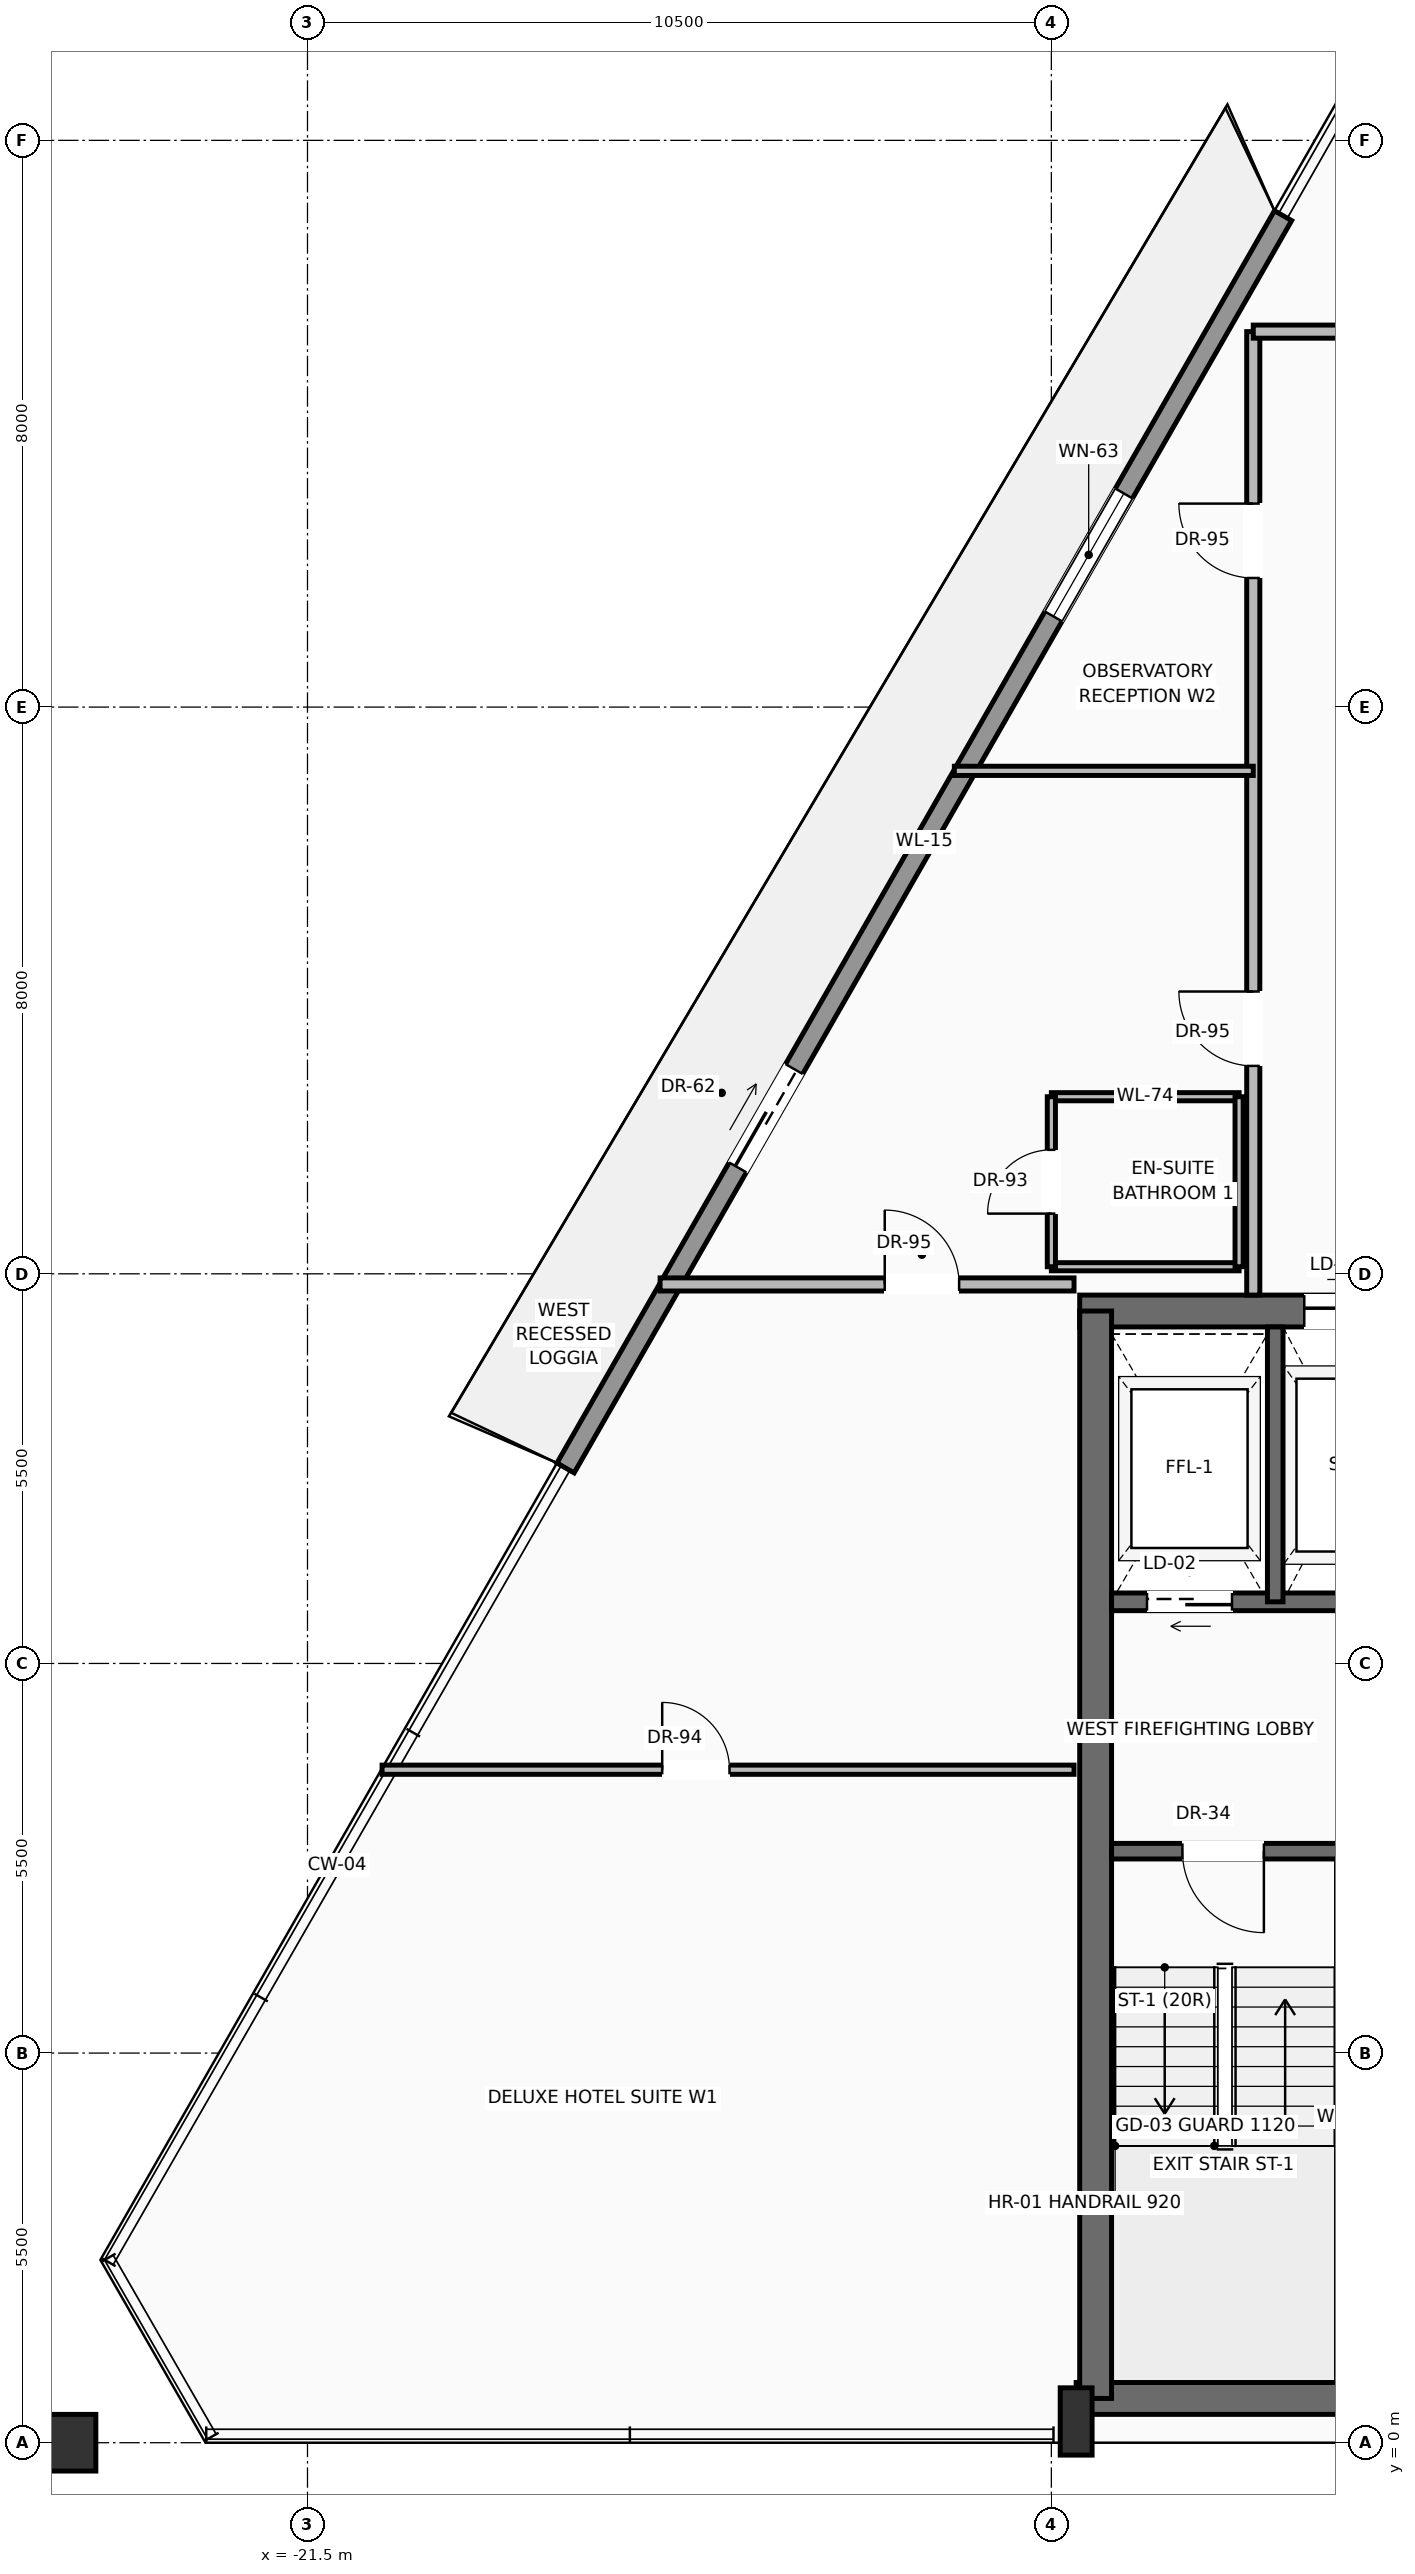
"""IFC4 building model, lengths in metres.
Left out: names, types, materials, properties, quantities, classifications, styles, units other than length and angle.
Written with IfcOpenShell. Run it as: python <this file> out.ifc"""

import sys

from ifc_helpers import new_model, si_unit, direction, frame, frame_2d, origin, origin_2d, place, context, subcontext, project, spatial, rectangle, hollow_rectangle, extrude, source, transform, mapped, element, fill, save


model = new_model("IFC4")
c1 = context("Model", 3, precision=1e-05, world=origin(), true_north=direction((0.0, 1.0)))
c2 = subcontext(c1, "Body", "Model", "MODEL_VIEW")
j1 = project(units=[si_unit("LENGTHUNIT", "METRE"), si_unit("PLANEANGLEUNIT", "RADIAN")], contexts=[c1])
p1 = place(None, origin())
s1 = spatial("IfcSite", under=j1, at=p1, CompositionType="ELEMENT")
p2 = place(p1, origin())
s2 = spatial("IfcBuilding", under=s1, at=p2, CompositionType="ELEMENT")
p3 = place(p2, frame((0.0, 0.0, 297.15)))
s3 = spatial("IfcBuildingStorey", under=s2, at=p3, CompositionType="ELEMENT", Elevation=297.15)
p4 = place(p3, frame((-10.65, 0.625, 0.0), z_axis=(0.0, 0.0, 1.0), x_axis=(1.0, 0.0, 0.0)))
e1 = element("IfcWall", 1, at=p4, inside=s3, PredefinedType="SHEAR", context=c2, shape_type="SweptSolid", body=[
    extrude(rectangle(XDim=21.3, YDim=0.45, at=frame_2d((10.65, 0.0))), origin(), (0.0, 0.0, 1.0), 3.24),
])
p5 = place(p3, frame((-10.6, 15.975, 0.0), z_axis=(0.0, 0.0, 1.0), x_axis=(1.0, 0.0, 0.0)))
e2 = element("IfcWall", 2, at=p5, inside=s3, PredefinedType="SHEAR", context=c2, shape_type="SweptSolid", body=[
    extrude(rectangle(XDim=21.2, YDim=0.45, at=frame_2d((10.6, 0.0))), origin(), (0.0, 0.0, 1.0), 3.24),
])
p6 = place(p5, frame((3.17, 0.0, 0.0)))
e3 = element("IfcOpeningElement", 3, at=p6, cuts=e2, PredefinedType="OPENING", context=c2, shape_type="SweptSolid", body=[
    extrude(rectangle(XDim=1.3, YDim=2.3, at=frame_2d((0.65, 1.15))), frame((0.0, 0.235, 0.0), z_axis=(0.0, -1.0, 0.0), x_axis=(1.0, 0.0, 0.0)), (0.0, 0.0, 1.0), 0.47),
])
p7 = place(p5, frame((9.6, 0.0, 0.0)))
e4 = element("IfcOpeningElement", 4, at=p7, cuts=e2, PredefinedType="OPENING", context=c2, shape_type="SweptSolid", body=[
    extrude(rectangle(XDim=2.0, YDim=2.4, at=frame_2d((1.0, 1.2))), frame((0.0, 0.235, 0.0), z_axis=(0.0, -1.0, 0.0), x_axis=(1.0, 0.0, 0.0)), (0.0, 0.0, 1.0), 0.47),
])
p8 = place(p3, frame((-10.375, 0.625, 0.0), z_axis=(0.0, 0.0, 1.0), x_axis=(0.0, 1.0, 0.0)))
e5 = element("IfcWall", 5, at=p8, inside=s3, PredefinedType="SHEAR", context=c2, shape_type="SweptSolid", body=[
    extrude(rectangle(XDim=15.35, YDim=0.45, at=frame_2d((7.675, 0.0))), origin(), (0.0, 0.0, 1.0), 3.24),
])
m1 = source(origin(), c2, "Body", "SweptSolid", [
    extrude(rectangle(XDim=0.45, YDim=0.95, at=origin_2d()), origin(), (0.0, 0.0, 1.0), 3.45),
])
p9 = place(p3, frame((-10.65, 0.3, 0.0), z_axis=(0.0, 0.0, 1.0), x_axis=(1.0, 0.0, 0.0)))
e6 = element("IfcColumn", 6, at=p9, inside=s3, PredefinedType="PILASTER", context=c2, shape_type="MappedRepresentation", body=[
    mapped(m1, transform((0.0, 0.0, 0.0), scale=1.0)),
])
m2 = source(origin(), c2, "Body", "SweptSolid", [
    extrude(hollow_rectangle(XDim=0.8, YDim=0.8, WallThickness=0.04, at=origin_2d()), origin(), (0.0, 0.0, 1.0), 3.441),
])
p10 = place(p3, frame((-24.888, 0.0, 0.004), z_axis=(0.003547083247, 0.0, 0.99999370908), x_axis=(0.0, 1.0, 0.0)))
e7 = element("IfcColumn", 7, at=p10, inside=s3, PredefinedType="COLUMN", context=c2, shape_type="MappedRepresentation", body=[
    mapped(m2, transform((0.0, 0.0, 0.0), scale=1.0)),
])
m3 = source(origin(), c2, "Body", "SweptSolid", [
    extrude(hollow_rectangle(XDim=0.8, YDim=0.8, WallThickness=0.04, at=origin_2d()), origin(), (0.0, 0.0, 1.0), 3.442),
])
p11 = place(p3, frame((-25.693, 1.352, 0.004), z_axis=(0.014114259928, -0.016029260019, 0.99977189923), x_axis=(0.750515848347, 0.660852450536, 0.0)))
e8 = element("IfcColumn", 8, at=p11, inside=s3, PredefinedType="COLUMN", context=c2, shape_type="MappedRepresentation", body=[
    mapped(m3, transform((0.0, 0.0, 0.0), scale=1.0)),
])
p12 = place(p3, frame((-17.857, 13.76, 0.0), z_axis=(0.0, 0.0, 1.0), x_axis=(0.497115564006, 0.867684341234, 0.0)))
e9 = element("IfcWall", 9, at=p12, inside=s3, PredefinedType="SOLIDWALL", context=c2, shape_type="SweptSolid", body=[
    extrude(rectangle(XDim=20.373, YDim=0.28, at=frame_2d((10.187, 0.0))), origin(), (0.0, 0.0, 1.0), 2.82),
])
p13 = place(p12, frame((4.889, 0.0, 0.0)))
e10 = element("IfcOpeningElement", 10, at=p13, cuts=e9, PredefinedType="OPENING", context=c2, shape_type="SweptSolid", body=[
    extrude(rectangle(XDim=1.6, YDim=2.35, at=frame_2d((0.8, 1.175))), frame((0.0, 0.15, 0.0), z_axis=(0.0, -1.0, 0.0), x_axis=(1.0, 0.0, 0.0)), (0.0, 0.0, 1.0), 0.3),
])
p14 = place(p12, frame((13.854, 0.0, 0.9)))
e11 = element("IfcOpeningElement", 11, at=p14, cuts=e9, PredefinedType="OPENING", context=c2, shape_type="SweptSolid", body=[
    extrude(rectangle(XDim=2.0, YDim=1.75, at=frame_2d((1.0, 0.875))), frame((0.0, 0.15, 0.0), z_axis=(0.0, -1.0, 0.0), x_axis=(1.0, 0.0, 0.0)), (0.0, 0.0, 1.0), 0.3),
])
p15 = place(p3, frame((-5.5, 8.35, 0.0), z_axis=(0.0, 0.0, 1.0), x_axis=(-1.0, 0.0, 0.0)))
e12 = element("IfcWall", 12, at=p15, inside=s3, PredefinedType="SOLIDWALL", context=c2, shape_type="SweptSolid", body=[
    extrude(rectangle(XDim=4.65, YDim=0.22, at=frame_2d((2.325, 0.0))), origin(), (0.0, 0.0, 1.0), 3.24),
])
p16 = place(p15, frame((2.5, 0.0, 0.0)))
e13 = element("IfcOpeningElement", 13, at=p16, cuts=e12, PredefinedType="OPENING", context=c2, shape_type="SweptSolid", body=[
    extrude(rectangle(XDim=1.15, YDim=2.2, at=frame_2d((0.575, 1.1))), frame((0.0, 0.12, 0.0), z_axis=(0.0, -1.0, 0.0), x_axis=(1.0, 0.0, 0.0)), (0.0, 0.0, 1.0), 0.24),
])
p17 = place(p3, frame((-5.5, 11.87, 0.0), z_axis=(0.0, 0.0, 1.0), x_axis=(-1.0, 0.0, 0.0)))
e14 = element("IfcWall", 14, at=p17, inside=s3, PredefinedType="SOLIDWALL", context=c2, shape_type="SweptSolid", body=[
    extrude(rectangle(XDim=4.65, YDim=0.25, at=frame_2d((2.325, 0.0))), origin(), (0.0, 0.0, 1.0), 3.24),
])
p18 = place(p17, frame((2.95, 0.0, 0.0)))
e15 = element("IfcOpeningElement", 15, at=p18, cuts=e14, PredefinedType="OPENING", context=c2, shape_type="SweptSolid", body=[
    extrude(rectangle(XDim=1.2, YDim=2.25, at=frame_2d((0.6, 1.125))), frame((0.0, 0.135, 0.0), z_axis=(0.0, -1.0, 0.0), x_axis=(1.0, 0.0, 0.0)), (0.0, 0.0, 1.0), 0.27),
])
p19 = place(p3, frame((-7.84, 11.87, 0.0), z_axis=(0.0, 0.0, 1.0), x_axis=(0.0, 1.0, 0.0)))
e16 = element("IfcWall", 16, at=p19, inside=s3, PredefinedType="SOLIDWALL", context=c2, shape_type="SweptSolid", body=[
    extrude(rectangle(XDim=3.88, YDim=0.22, at=frame_2d((1.94, 0.0))), origin(), (0.0, 0.0, 1.0), 3.24),
])
p20 = place(p3, frame((-8.15, 16.2, 0.0), z_axis=(0.0, 0.0, 1.0), x_axis=(0.0, 1.0, 0.0)))
e17 = element("IfcWall", 17, at=p20, inside=s3, PredefinedType="PARTITIONING", context=c2, shape_type="SweptSolid", body=[
    extrude(rectangle(XDim=13.6, YDim=0.185, at=frame_2d((6.8, 0.0))), origin(), (0.0, 0.0, 1.0), 3.232),
])
p21 = place(p20, frame((3.235, 0.0, 0.0)))
e18 = element("IfcOpeningElement", 18, at=p21, cuts=e17, PredefinedType="OPENING", context=c2, shape_type="SweptSolid", body=[
    extrude(rectangle(XDim=1.05, YDim=2.25, at=frame_2d((0.525, 1.125))), frame((0.0, 0.103, 0.0), z_axis=(0.0, -1.0, 0.0), x_axis=(1.0, 0.0, 0.0)), (0.0, 0.0, 1.0), 0.205),
])
p22 = place(p20, frame((10.123, 0.0, 0.0)))
e19 = element("IfcOpeningElement", 19, at=p22, cuts=e17, PredefinedType="OPENING", context=c2, shape_type="SweptSolid", body=[
    extrude(rectangle(XDim=1.05, YDim=2.25, at=frame_2d((0.525, 1.125))), frame((0.0, 0.103, 0.0), z_axis=(0.0, -1.0, 0.0), x_axis=(1.0, 0.0, 0.0)), (0.0, 0.0, 1.0), 0.205),
])
p23 = place(p3, frame((-8.15, 29.8, 0.0), z_axis=(0.0, 0.0, 1.0), x_axis=(1.0, 0.0, 0.0)))
e20 = element("IfcWall", 20, at=p23, inside=s3, PredefinedType="PARTITIONING", context=c2, shape_type="SweptSolid", body=[
    extrude(rectangle(XDim=16.3, YDim=0.185, at=frame_2d((8.15, 0.0))), origin(), (0.0, 0.0, 1.0), 3.232),
])
p24 = place(p23, frame((3.347, 0.0, 0.0)))
e21 = element("IfcOpeningElement", 21, at=p24, cuts=e20, PredefinedType="OPENING", context=c2, shape_type="SweptSolid", body=[
    extrude(rectangle(XDim=1.05, YDim=2.25, at=frame_2d((0.525, 1.125))), frame((0.0, 0.103, 0.0), z_axis=(0.0, -1.0, 0.0), x_axis=(1.0, 0.0, 0.0)), (0.0, 0.0, 1.0), 0.205),
])
p25 = place(p23, frame((7.625, 0.0, 0.0)))
e22 = element("IfcOpeningElement", 22, at=p25, cuts=e20, PredefinedType="OPENING", context=c2, shape_type="SweptSolid", body=[
    extrude(rectangle(XDim=1.05, YDim=2.25, at=frame_2d((0.525, 1.125))), frame((0.0, 0.103, 0.0), z_axis=(0.0, -1.0, 0.0), x_axis=(1.0, 0.0, 0.0)), (0.0, 0.0, 1.0), 0.205),
])
p26 = place(p23, frame((11.903, 0.0, 0.0)))
e23 = element("IfcOpeningElement", 23, at=p26, cuts=e20, PredefinedType="OPENING", context=c2, shape_type="SweptSolid", body=[
    extrude(rectangle(XDim=1.05, YDim=2.25, at=frame_2d((0.525, 1.125))), frame((0.0, 0.103, 0.0), z_axis=(0.0, -1.0, 0.0), x_axis=(1.0, 0.0, 0.0)), (0.0, 0.0, 1.0), 0.205),
])
p27 = place(p3, frame((-16.523, 16.35, 0.0), z_axis=(0.0, 0.0, 1.0), x_axis=(1.0, 0.0, 0.0)))
e24 = element("IfcWall", 24, at=p27, inside=s3, PredefinedType="PARTITIONING", context=c2, shape_type="SweptSolid", body=[
    extrude(rectangle(XDim=5.843, YDim=0.185, at=frame_2d((2.921, 0.0))), origin(), (0.0, 0.0, 1.0), 3.232),
])
p28 = place(p27, frame((3.171, 0.0, 0.0)))
e25 = element("IfcOpeningElement", 25, at=p28, cuts=e24, PredefinedType="OPENING", context=c2, shape_type="SweptSolid", body=[
    extrude(rectangle(XDim=1.05, YDim=2.25, at=frame_2d((0.525, 1.125))), frame((0.0, 0.103, 0.0), z_axis=(0.0, -1.0, 0.0), x_axis=(1.0, 0.0, 0.0)), (0.0, 0.0, 1.0), 0.205),
])
p29 = place(p3, frame((-20.448, 9.5, 0.0), z_axis=(0.0, 0.0, 1.0), x_axis=(1.0, 0.0, 0.0)))
e26 = element("IfcWall", 26, at=p29, inside=s3, PredefinedType="PARTITIONING", context=c2, shape_type="SweptSolid", body=[
    extrude(rectangle(XDim=9.768, YDim=0.13, at=frame_2d((4.884, 0.0))), origin(), (0.0, 0.0, 1.0), 3.232),
])
p30 = place(p29, frame((3.954, 0.0, 0.0)))
e27 = element("IfcOpeningElement", 27, at=p30, cuts=e26, PredefinedType="OPENING", context=c2, shape_type="SweptSolid", body=[
    extrude(rectangle(XDim=0.95, YDim=2.2, at=frame_2d((0.475, 1.1))), frame((0.0, 0.075, 0.0), z_axis=(0.0, -1.0, 0.0), x_axis=(1.0, 0.0, 0.0)), (0.0, 0.0, 1.0), 0.15),
])
for number, where, z_axis, x_axis in (
    (28, (-11.0, 16.6, 0.0), (0.0, 0.0, 1.0), (1.0, 0.0, 0.0)),
    (29, (-11.0, 19.0, 0.0), (0.0, 0.0, 1.0), (1.0, 0.0, 0.0)),
):
    element("IfcWall", number, at=place(p3, frame(where, z_axis=z_axis, x_axis=x_axis)), inside=s3, PredefinedType="PARTITIONING", context=c2, shape_type="SweptSolid", body=[
        extrude(rectangle(XDim=2.65, YDim=0.115, at=frame_2d((1.325, 0.0))), origin(), (0.0, 0.0, 1.0), 3.232),
    ])
p31 = place(p3, frame((-11.0, 16.6, 0.0), z_axis=(0.0, 0.0, 1.0), x_axis=(0.0, 1.0, 0.0)))
e30 = element("IfcWall", 30, at=p31, inside=s3, PredefinedType="PARTITIONING", context=c2, shape_type="SweptSolid", body=[
    extrude(rectangle(XDim=2.4, YDim=0.115, at=frame_2d((1.2, 0.0))), origin(), (0.0, 0.0, 1.0), 3.232),
])
p32 = place(p31, frame((0.75, 0.0, 0.0)))
e31 = element("IfcOpeningElement", 31, at=p32, cuts=e30, PredefinedType="OPENING", context=c2, shape_type="SweptSolid", body=[
    extrude(rectangle(XDim=0.9, YDim=2.15, at=frame_2d((0.45, 1.075))), frame((0.0, 0.067, 0.0), z_axis=(0.0, -1.0, 0.0), x_axis=(1.0, 0.0, 0.0)), (0.0, 0.0, 1.0), 0.135),
])
p33 = place(p3, frame((-8.35, 16.6, 0.0), z_axis=(0.0, 0.0, 1.0), x_axis=(0.0, 1.0, 0.0)))
e32 = element("IfcWall", 32, at=p33, inside=s3, PredefinedType="PARTITIONING", context=c2, shape_type="SweptSolid", body=[
    extrude(rectangle(XDim=2.4, YDim=0.115, at=frame_2d((1.2, 0.0))), origin(), (0.0, 0.0, 1.0), 3.232),
])
p34 = place(p3, frame((-12.369, 23.6, 0.0), z_axis=(0.0, 0.0, 1.0), x_axis=(1.0, 0.0, 0.0)))
e33 = element("IfcWall", 33, at=p34, inside=s3, PredefinedType="PARTITIONING", context=c2, shape_type="SweptSolid", body=[
    extrude(rectangle(XDim=4.219, YDim=0.13, at=frame_2d((2.11, 0.0))), origin(), (0.0, 0.0, 1.0), 3.232),
])
m4 = source(origin(), c2, "Body", "SweptSolid", [
    extrude(rectangle(XDim=1.6, YDim=2.35, at=frame_2d((0.8, 1.175))), frame((0.0, 0.025, 0.0), z_axis=(0.0, -1.0, 0.0), x_axis=(1.0, 0.0, 0.0)), (0.0, 0.0, 1.0), 0.05),
])
p35 = place(p13, origin())
e34 = element("IfcDoor", 34, at=p35, inside=s3, OperationType="SLIDING_TO_LEFT", PredefinedType="DOOR", context=c2, shape_type="MappedRepresentation", body=[
    mapped(m4, transform((0.0, 0.0, 0.0), scale=1.0)),
])
fill(e10, e34)
m5 = source(origin(), c2, "Body", "SweptSolid", [
    extrude(rectangle(XDim=2.0, YDim=1.75, at=frame_2d((1.0, 0.875))), frame((0.0, 0.03, 0.0), z_axis=(0.0, -1.0, 0.0), x_axis=(1.0, 0.0, 0.0)), (0.0, 0.0, 1.0), 0.06),
])
p36 = place(p14, origin())
e35 = element("IfcWindow", 35, at=p36, inside=s3, PartitioningType="SINGLE_PANEL", PredefinedType="WINDOW", context=c2, shape_type="MappedRepresentation", body=[
    mapped(m5, transform((0.0, 0.0, 0.0), scale=1.0)),
])
fill(e11, e35)
m6 = source(origin(), c2, "Body", "SweptSolid", [
    extrude(rectangle(XDim=1.15, YDim=2.2, at=frame_2d((0.575, 1.1))), frame((0.0, 0.025, 0.0), z_axis=(0.0, -1.0, 0.0), x_axis=(1.0, 0.0, 0.0)), (0.0, 0.0, 1.0), 0.05),
])
p37 = place(p16, origin())
e36 = element("IfcDoor", 36, at=p37, inside=s3, OperationType="SINGLE_SWING_LEFT", PredefinedType="DOOR", context=c2, shape_type="MappedRepresentation", body=[
    mapped(m6, transform((0.0, 0.0, 0.0), scale=1.0)),
])
fill(e13, e36)
m7 = source(origin(), c2, "Body", "SweptSolid", [
    extrude(rectangle(XDim=1.2, YDim=2.25, at=frame_2d((0.6, 1.125))), frame((0.0, 0.025, 0.0), z_axis=(0.0, -1.0, 0.0), x_axis=(1.0, 0.0, 0.0)), (0.0, 0.0, 1.0), 0.05),
])
p38 = place(p18, origin())
e37 = element("IfcDoor", 37, at=p38, inside=s3, OperationType="SLIDING_TO_LEFT", PredefinedType="DOOR", context=c2, shape_type="MappedRepresentation", body=[
    mapped(m7, transform((0.0, 0.0, 0.0), scale=1.0)),
])
fill(e15, e37)
m8 = source(origin(), c2, "Body", "SweptSolid", [
    extrude(rectangle(XDim=1.3, YDim=2.3, at=frame_2d((0.65, 1.15))), frame((0.0, 0.025, 0.0), z_axis=(0.0, -1.0, 0.0), x_axis=(1.0, 0.0, 0.0)), (0.0, 0.0, 1.0), 0.05),
])
p39 = place(p6, origin())
e38 = element("IfcDoor", 38, at=p39, inside=s3, OperationType="SLIDING_TO_RIGHT", PredefinedType="DOOR", context=c2, shape_type="MappedRepresentation", body=[
    mapped(m8, transform((0.0, 0.0, 0.0), scale=1.0)),
])
fill(e3, e38)
m9 = source(origin(), c2, "Body", "SweptSolid", [
    extrude(rectangle(XDim=1.05, YDim=2.25, at=frame_2d((0.525, 1.125))), frame((0.0, 0.025, 0.0), z_axis=(0.0, -1.0, 0.0), x_axis=(1.0, 0.0, 0.0)), (0.0, 0.0, 1.0), 0.05),
])
p40 = place(p28, origin())
e39 = element("IfcDoor", 39, at=p40, inside=s3, OperationType="SINGLE_SWING_LEFT", PredefinedType="DOOR", context=c2, shape_type="MappedRepresentation", body=[
    mapped(m9, transform((0.0, 0.0, 0.0), scale=1.0)),
])
fill(e25, e39)
m10 = source(origin(), c2, "Body", "SweptSolid", [
    extrude(rectangle(XDim=0.95, YDim=2.2, at=frame_2d((0.475, 1.1))), frame((0.0, 0.025, 0.0), z_axis=(0.0, -1.0, 0.0), x_axis=(1.0, 0.0, 0.0)), (0.0, 0.0, 1.0), 0.05),
])
p41 = place(p30, origin())
e40 = element("IfcDoor", 40, at=p41, inside=s3, OperationType="SINGLE_SWING_LEFT", PredefinedType="DOOR", context=c2, shape_type="MappedRepresentation", body=[
    mapped(m10, transform((0.0, 0.0, 0.0), scale=1.0)),
])
fill(e27, e40)
p42 = place(p21, origin())
e41 = element("IfcDoor", 41, at=p42, inside=s3, OperationType="SINGLE_SWING_RIGHT", PredefinedType="DOOR", context=c2, shape_type="MappedRepresentation", body=[
    mapped(m9, transform((0.0, 0.0, 0.0), scale=1.0)),
])
fill(e18, e41)
m11 = source(origin(), c2, "Body", "SweptSolid", [
    extrude(rectangle(XDim=0.9, YDim=2.15, at=frame_2d((0.45, 1.075))), frame((0.0, 0.025, 0.0), z_axis=(0.0, -1.0, 0.0), x_axis=(1.0, 0.0, 0.0)), (0.0, 0.0, 1.0), 0.05),
])
p43 = place(p32, origin())
e42 = element("IfcDoor", 42, at=p43, inside=s3, OperationType="SINGLE_SWING_LEFT", PredefinedType="DOOR", context=c2, shape_type="MappedRepresentation", body=[
    mapped(m11, transform((0.0, 0.0, 0.0), scale=1.0)),
])
fill(e31, e42)
p44 = place(p22, origin())
e43 = element("IfcDoor", 43, at=p44, inside=s3, OperationType="SINGLE_SWING_RIGHT", PredefinedType="DOOR", context=c2, shape_type="MappedRepresentation", body=[
    mapped(m9, transform((0.0, 0.0, 0.0), scale=1.0)),
])
fill(e19, e43)
save(model, sys.argv[1])
